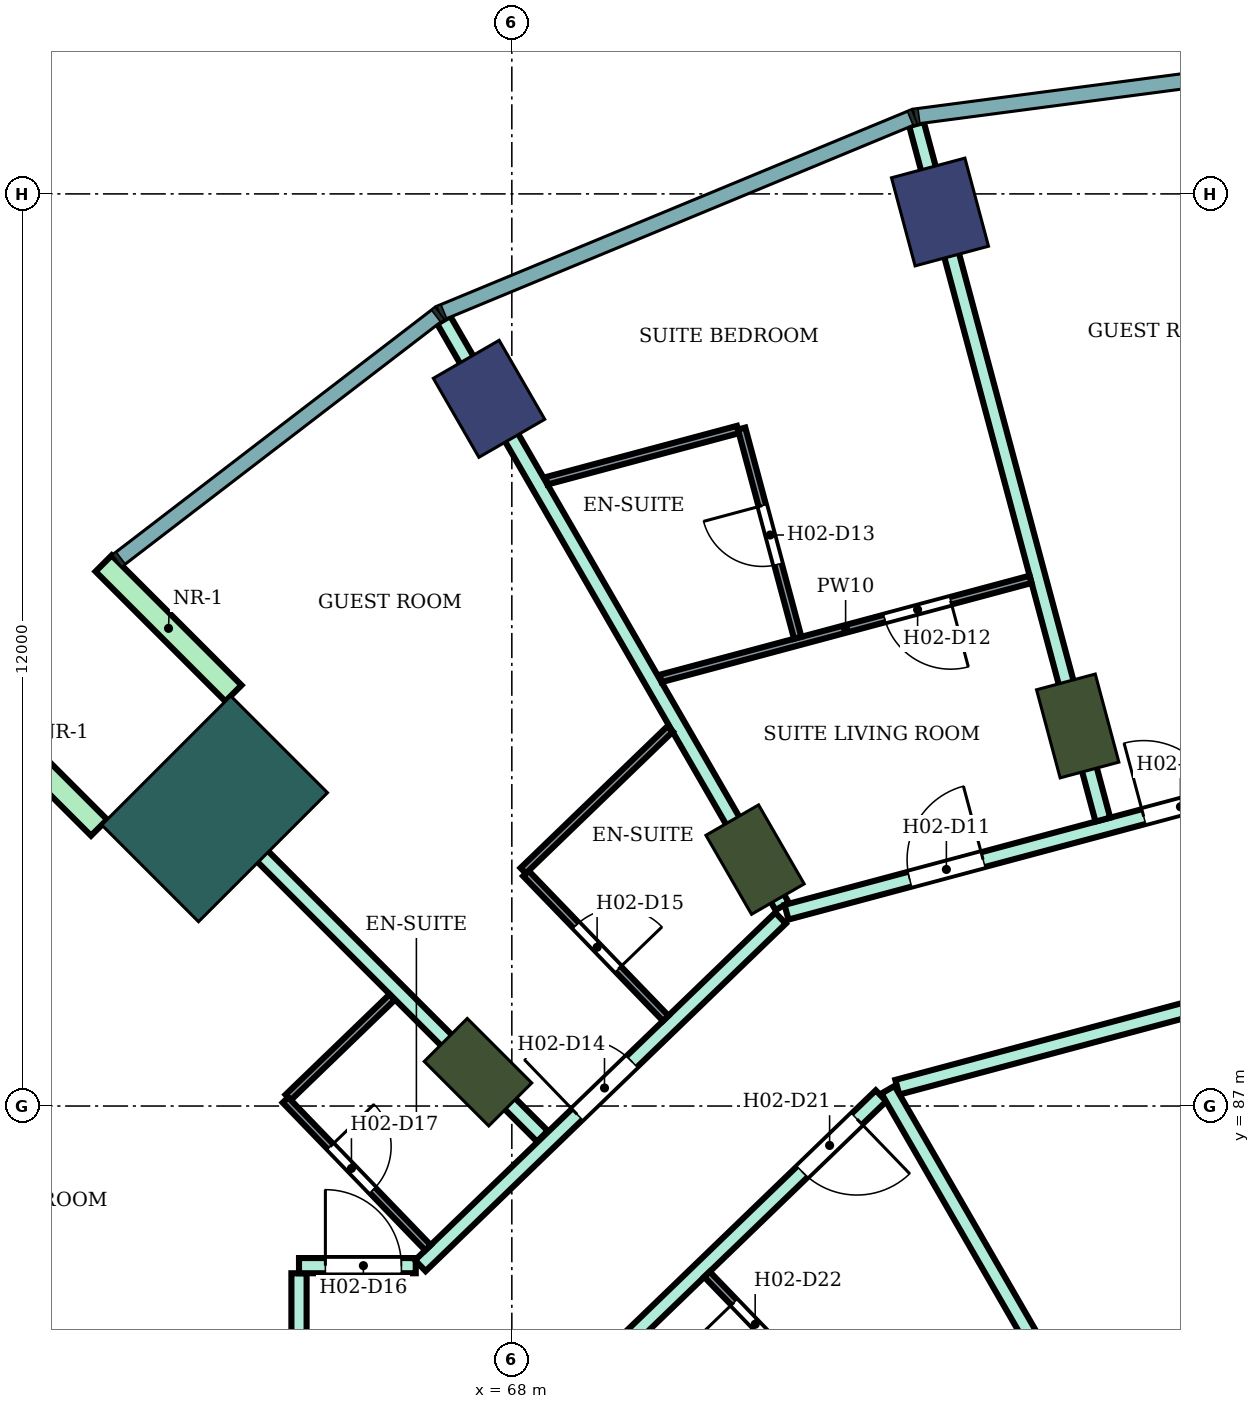
"""IFC4 building model, lengths in metres.
Left out: names, types, materials, properties, quantities, classifications, styles, units other than length and angle.
Written with IfcOpenShell. Run it as: python <this file> out.ifc"""

import sys

from ifc_helpers import new_model, si_unit, direction, frame, frame_2d, origin, origin_2d, place, context, subcontext, project, spatial, rectangle, extrude, element, fill, save


model = new_model("IFC4")
c1 = context("Model", 3, precision=1e-05, world=origin(), true_north=direction((0.0, 1.0)))
c2 = subcontext(c1, "Body", "Model", "MODEL_VIEW")
j1 = project(units=[si_unit("LENGTHUNIT", "METRE"), si_unit("PLANEANGLEUNIT", "RADIAN")], contexts=[c1])
p1 = place(None, origin())
s1 = spatial("IfcSite", under=j1, at=p1, CompositionType="ELEMENT")
p2 = place(p1, origin())
s2 = spatial("IfcBuilding", under=s1, at=p2, CompositionType="ELEMENT")
p3 = place(p2, frame((0.0, 0.0, 47.8)))
s3 = spatial("IfcBuildingStorey", under=s2, at=p3, CompositionType="ELEMENT", Elevation=47.8)
for number, where, z_axis, x_axis in (
    (1, (73.633, 98.762, 0.0), (0.0, 0.0, 1.0), (-0.259, 0.966, 0.0)),
    (2, (67.7, 96.304, 0.0), (0.0, 0.0, 1.0), (-0.5, 0.866, 0.0)),
):
    element("IfcColumn", number, at=place(p3, frame(where, z_axis=z_axis, x_axis=x_axis)), inside=s3, PredefinedType="COLUMN", context=c2, shape_type="SweptSolid", body=[
        extrude(rectangle(XDim=1.2, YDim=1.0, at=origin_2d()), origin(), (0.0, 0.0, 1.0), 3.8),
    ])
for number, where, z_axis, x_axis in (
    (3, (75.445, 92.0, 0.0), (0.0, 0.0, 1.0), (-0.259, 0.966, 0.0)),
    (4, (71.2, 90.242, 0.0), (0.0, 0.0, 1.0), (-0.5, 0.866, 0.0)),
    (5, (67.555, 87.445, 0.0), (0.0, 0.0, 1.0), (-0.707, 0.707, 0.0)),
):
    element("IfcColumn", number, at=place(p3, frame(where, z_axis=z_axis, x_axis=x_axis)), inside=s3, PredefinedType="COLUMN", context=c2, shape_type="SweptSolid", body=[
        extrude(rectangle(XDim=1.2, YDim=0.8, at=origin_2d()), origin(), (0.0, 0.0, 1.0), 3.8),
    ])
p4 = place(p3, frame((64.09, 90.91, 0.0), z_axis=(0.0, 0.0, 1.0), x_axis=(-0.707106781187, 0.707106781187, 0.0)))
e6 = element("IfcColumn", 6, at=p4, inside=s3, PredefinedType="COLUMN", context=c2, shape_type="SweptSolid", body=[
    extrude(rectangle(XDim=1.8, YDim=2.4, at=origin_2d()), origin(), (0.0, 0.0, 1.0), 3.8),
])
for number, where, z_axis, x_axis in (
    (7, (64.338, 92.43, 0.0), (0.0, 0.0, 1.0), (-0.707, 0.707, 0.0)),
    (8, (62.57, 90.662, 0.0), (0.0, 0.0, 1.0), (-0.707, 0.707, 0.0)),
):
    element("IfcWall", number, at=place(p3, frame(where, z_axis=z_axis, x_axis=x_axis)), inside=s3, PredefinedType="NOTDEFINED", context=c2, shape_type="SweptSolid", body=[
        extrude(rectangle(XDim=2.416, YDim=0.3, at=frame_2d((1.208, 0.0))), origin(), (0.0, 0.0, 1.0), 3.8),
    ])
p5 = place(p3, frame((63.599, 91.408, 0.0), z_axis=(0.0, 0.0, 1.0), x_axis=(0.706981017422, -0.707232522587, 0.0)))
e9 = element("IfcWall", 9, at=p5, inside=s3, PredefinedType="PARTITIONING", context=c2, shape_type="SweptSolid", body=[
    extrude(rectangle(XDim=6.795, YDim=0.2, at=frame_2d((3.397, 0.0))), origin(), (0.0, 0.0, 1.0), 3.35),
])
p6 = place(p3, frame((65.2, 83.401, 0.0), z_axis=(0.0, 0.0, 1.0), x_axis=(0.0, 1.0, 0.0)))
e10 = element("IfcWall", 10, at=p6, inside=s3, PredefinedType="PARTITIONING", context=c2, shape_type="SweptSolid", body=[
    extrude(rectangle(XDim=1.399, YDim=0.2, at=frame_2d((0.7, 0.0))), origin(), (0.0, 0.0, 1.0), 3.35),
])
p7 = place(p3, frame((65.2, 84.9, 0.0), z_axis=(0.0, 0.0, 1.0), x_axis=(1.0, 0.0, 0.0)))
e11 = element("IfcWall", 11, at=p7, inside=s3, PredefinedType="PARTITIONING", context=c2, shape_type="SweptSolid", body=[
    extrude(rectangle(XDim=1.536, YDim=0.2, at=frame_2d((0.768, 0.0))), origin(), (0.0, 0.0, 1.0), 3.35),
])
p8 = place(p7, frame((0.347, 0.0, 0.0)))
e12 = element("IfcOpeningElement", 12, at=p8, cuts=e11, PredefinedType="OPENING", context=c2, shape_type="SweptSolid", body=[
    extrude(rectangle(XDim=1.0, YDim=2.1, at=frame_2d((0.5, 1.05))), frame((0.0, 0.11, 0.0), z_axis=(0.0, -1.0, 0.0), x_axis=(1.0, 0.0, 0.0)), (0.0, 0.0, 1.0), 0.22),
])
p9 = place(p3, frame((66.796, 84.9, 0.0), z_axis=(0.0, 0.0, 1.0), x_axis=(0.719690131178, 0.694295409092, 0.0)))
e13 = element("IfcWall", 13, at=p9, inside=s3, PredefinedType="PARTITIONING", context=c2, shape_type="SweptSolid", body=[
    extrude(rectangle(XDim=6.585, YDim=0.2, at=frame_2d((3.293, 0.0))), origin(), (0.0, 0.0, 1.0), 3.35),
])
p10 = place(p9, frame((2.867, 0.0, 0.0)))
e14 = element("IfcOpeningElement", 14, at=p10, cuts=e13, PredefinedType="OPENING", context=c2, shape_type="SweptSolid", body=[
    extrude(rectangle(XDim=1.0, YDim=2.1, at=frame_2d((0.5, 1.05))), frame((0.0, 0.11, 0.0), z_axis=(0.0, -1.0, 0.0), x_axis=(1.0, 0.0, 0.0)), (0.0, 0.0, 1.0), 0.22),
])
p11 = place(p3, frame((67.103, 97.343, 0.0), z_axis=(0.0, 0.0, 1.0), x_axis=(0.499900389553, -0.866082906265, 0.0)))
e15 = element("IfcWall", 15, at=p11, inside=s3, PredefinedType="PARTITIONING", context=c2, shape_type="SweptSolid", body=[
    extrude(rectangle(XDim=8.908, YDim=0.2, at=frame_2d((4.454, 0.0))), origin(), (0.0, 0.0, 1.0), 3.35),
])
p12 = place(p3, frame((68.987, 83.4, 0.0), z_axis=(0.0, 0.0, 1.0), x_axis=(0.719591503389, 0.694397629784, 0.0)))
e16 = element("IfcWall", 16, at=p12, inside=s3, PredefinedType="PARTITIONING", context=c2, shape_type="SweptSolid", body=[
    extrude(rectangle(XDim=5.378, YDim=0.2, at=frame_2d((2.689, 0.0))), origin(), (0.0, 0.0, 1.0), 3.35),
])
p13 = place(p12, frame((3.938, 0.0, 0.0)))
e17 = element("IfcOpeningElement", 17, at=p13, cuts=e16, PredefinedType="OPENING", context=c2, shape_type="SweptSolid", body=[
    extrude(rectangle(XDim=1.0, YDim=2.1, at=frame_2d((0.5, 1.05))), frame((0.0, 0.11, 0.0), z_axis=(0.0, -1.0, 0.0), x_axis=(1.0, 0.0, 0.0)), (0.0, 0.0, 1.0), 0.22),
])
p14 = place(p3, frame((71.614, 89.55, 0.0), z_axis=(0.0, 0.0, 1.0), x_axis=(0.96597505802, 0.258635239832, 0.0)))
e18 = element("IfcWall", 18, at=p14, inside=s3, PredefinedType="PARTITIONING", context=c2, shape_type="SweptSolid", body=[
    extrude(rectangle(XDim=8.592, YDim=0.2, at=frame_2d((4.296, 0.0))), origin(), (0.0, 0.0, 1.0), 3.35),
])
p15 = place(p14, frame((4.865, 0.0, 0.0)))
e19 = element("IfcOpeningElement", 19, at=p15, cuts=e18, PredefinedType="OPENING", context=c2, shape_type="SweptSolid", body=[
    extrude(rectangle(XDim=1.0, YDim=2.1, at=frame_2d((0.5, 1.05))), frame((0.0, 0.11, 0.0), z_axis=(0.0, -1.0, 0.0), x_axis=(1.0, 0.0, 0.0)), (0.0, 0.0, 1.0), 0.22),
])
p16 = place(p14, frame((1.677, 0.0, 0.0)))
e20 = element("IfcOpeningElement", 20, at=p16, cuts=e18, PredefinedType="OPENING", context=c2, shape_type="SweptSolid", body=[
    extrude(rectangle(XDim=1.0, YDim=2.1, at=frame_2d((0.5, 1.05))), frame((0.0, 0.11, 0.0), z_axis=(0.0, -1.0, 0.0), x_axis=(1.0, 0.0, 0.0)), (0.0, 0.0, 1.0), 0.22),
])
p17 = place(p3, frame((73.071, 87.247, 0.0), z_axis=(0.0, 0.0, 1.0), x_axis=(0.965920206274, 0.258840018373, 0.0)))
e21 = element("IfcWall", 21, at=p17, inside=s3, PredefinedType="PARTITIONING", context=c2, shape_type="SweptSolid", body=[
    extrude(rectangle(XDim=7.123, YDim=0.2, at=frame_2d((3.562, 0.0))), origin(), (0.0, 0.0, 1.0), 3.35),
])
p18 = place(p3, frame((72.949, 87.215, 0.0), z_axis=(0.0, 0.0, 1.0), x_axis=(0.499890755261, -0.866088467077, 0.0)))
e22 = element("IfcWall", 22, at=p18, inside=s3, PredefinedType="PARTITIONING", context=c2, shape_type="SweptSolid", body=[
    extrude(rectangle(XDim=6.404, YDim=0.2, at=frame_2d((3.202, 0.0))), origin(), (0.0, 0.0, 1.0), 3.35),
])
p19 = place(p3, frame((73.323, 99.919, 0.0), z_axis=(0.0, 0.0, 1.0), x_axis=(0.258786746607, -0.965934480066, 0.0)))
e23 = element("IfcWall", 23, at=p19, inside=s3, PredefinedType="PARTITIONING", context=c2, shape_type="SweptSolid", body=[
    extrude(rectangle(XDim=9.475, YDim=0.2, at=frame_2d((4.737, 0.0))), origin(), (0.0, 0.0, 1.0), 3.35),
])
p20 = place(p3, frame((65.058, 87.114, 0.0), z_axis=(0.0, 0.0, 1.0), x_axis=(0.719715847356, 0.694268751324, 0.0)))
e24 = element("IfcWall", 24, at=p20, inside=s3, PredefinedType="PARTITIONING", context=c2, shape_type="SweptSolid", body=[
    extrude(rectangle(XDim=1.9, YDim=0.1, at=frame_2d((0.95, 0.0))), origin(), (0.0, 0.0, 1.0), 3.35),
])
p21 = place(p3, frame((65.022, 87.079, 0.0), z_axis=(0.0, 0.0, 1.0), x_axis=(0.694287838235, -0.719697434815, 0.0)))
e25 = element("IfcWall", 25, at=p21, inside=s3, PredefinedType="PARTITIONING", context=c2, shape_type="SweptSolid", body=[
    extrude(rectangle(XDim=2.7, YDim=0.1, at=frame_2d((1.35, 0.0))), origin(), (0.0, 0.0, 1.0), 3.35),
])
p22 = place(p21, frame((0.85, 0.0, 0.0)))
e26 = element("IfcOpeningElement", 26, at=p22, cuts=e25, PredefinedType="OPENING", context=c2, shape_type="SweptSolid", body=[
    extrude(rectangle(XDim=0.8, YDim=2.1, at=frame_2d((0.4, 1.05))), frame((0.0, 0.06, 0.0), z_axis=(0.0, -1.0, 0.0), x_axis=(1.0, 0.0, 0.0)), (0.0, 0.0, 1.0), 0.12),
])
p23 = place(p3, frame((68.185, 90.06, 0.0), z_axis=(0.0, 0.0, 1.0), x_axis=(0.69446127412, -0.719530081892, 0.0)))
e27 = element("IfcWall", 27, at=p23, inside=s3, PredefinedType="PARTITIONING", context=c2, shape_type="SweptSolid", body=[
    extrude(rectangle(XDim=2.649, YDim=0.1, at=frame_2d((1.324, 0.0))), origin(), (0.0, 0.0, 1.0), 3.35),
])
p24 = place(p23, frame((0.95, 0.0, 0.0)))
e28 = element("IfcOpeningElement", 28, at=p24, cuts=e27, PredefinedType="OPENING", context=c2, shape_type="SweptSolid", body=[
    extrude(rectangle(XDim=0.8, YDim=2.1, at=frame_2d((0.4, 1.05))), frame((0.0, 0.06, 0.0), z_axis=(0.0, -1.0, 0.0), x_axis=(1.0, 0.0, 0.0)), (0.0, 0.0, 1.0), 0.12),
])
p25 = place(p3, frame((68.15, 90.096, 0.0), z_axis=(0.0, 0.0, 1.0), x_axis=(0.719623741095, 0.69436422089, 0.0)))
e29 = element("IfcWall", 29, at=p25, inside=s3, PredefinedType="PARTITIONING", context=c2, shape_type="SweptSolid", body=[
    extrude(rectangle(XDim=2.687, YDim=0.1, at=frame_2d((1.344, 0.0))), origin(), (0.0, 0.0, 1.0), 3.35),
])
p26 = place(p3, frame((68.457, 95.225, 0.0), z_axis=(0.0, 0.0, 1.0), x_axis=(0.965887416682, 0.258962349183, 0.0)))
e30 = element("IfcWall", 30, at=p26, inside=s3, PredefinedType="PARTITIONING", context=c2, shape_type="SweptSolid", body=[
    extrude(rectangle(XDim=2.607, YDim=0.1, at=frame_2d((1.303, 0.0))), origin(), (0.0, 0.0, 1.0), 3.35),
])
p27 = place(p3, frame((69.958, 92.625, 0.0), z_axis=(0.0, 0.0, 1.0), x_axis=(0.96595043048, 0.258727203548, 0.0)))
e31 = element("IfcWall", 31, at=p27, inside=s3, PredefinedType="PARTITIONING", context=c2, shape_type="SweptSolid", body=[
    extrude(rectangle(XDim=5.038, YDim=0.1, at=frame_2d((2.519, 0.0))), origin(), (0.0, 0.0, 1.0), 3.35),
])
p28 = place(p27, frame((3.049, 0.0, 0.0)))
e32 = element("IfcOpeningElement", 32, at=p28, cuts=e31, PredefinedType="OPENING", context=c2, shape_type="SweptSolid", body=[
    extrude(rectangle(XDim=0.9, YDim=2.1, at=frame_2d((0.45, 1.05))), frame((0.0, 0.06, 0.0), z_axis=(0.0, -1.0, 0.0), x_axis=(1.0, 0.0, 0.0)), (0.0, 0.0, 1.0), 0.12),
])
p29 = place(p3, frame((70.567, 84.786, 0.0), z_axis=(0.0, 0.0, 1.0), x_axis=(0.694447472534, -0.719543402368, 0.0)))
e33 = element("IfcWall", 33, at=p29, inside=s3, PredefinedType="PARTITIONING", context=c2, shape_type="SweptSolid", body=[
    extrude(rectangle(XDim=1.926, YDim=0.1, at=frame_2d((0.963, 0.0))), origin(), (0.0, 0.0, 1.0), 3.35),
])
p30 = place(p29, frame((0.513, 0.0, 0.0)))
e34 = element("IfcOpeningElement", 34, at=p30, cuts=e33, PredefinedType="OPENING", context=c2, shape_type="SweptSolid", body=[
    extrude(rectangle(XDim=0.8, YDim=2.1, at=frame_2d((0.4, 1.05))), frame((0.0, 0.06, 0.0), z_axis=(0.0, -1.0, 0.0), x_axis=(1.0, 0.0, 0.0)), (0.0, 0.0, 1.0), 0.12),
])
p31 = place(p3, frame((71.023, 95.913, 0.0), z_axis=(0.0, 0.0, 1.0), x_axis=(0.258968734817, -0.965885704619, 0.0)))
e35 = element("IfcWall", 35, at=p31, inside=s3, PredefinedType="PARTITIONING", context=c2, shape_type="SweptSolid", body=[
    extrude(rectangle(XDim=2.85, YDim=0.1, at=frame_2d((1.425, 0.0))), origin(), (0.0, 0.0, 1.0), 3.35),
])
p32 = place(p31, frame((1.05, 0.0, 0.0)))
e36 = element("IfcOpeningElement", 36, at=p32, cuts=e35, PredefinedType="OPENING", context=c2, shape_type="SweptSolid", body=[
    extrude(rectangle(XDim=0.8, YDim=2.1, at=frame_2d((0.4, 1.05))), frame((0.0, 0.06, 0.0), z_axis=(0.0, -1.0, 0.0), x_axis=(1.0, 0.0, 0.0)), (0.0, 0.0, 1.0), 0.12),
])
p33 = place(p15, origin())
e37 = element("IfcDoor", 37, at=p33, inside=s3, OperationType="SINGLE_SWING_LEFT", PredefinedType="DOOR", context=c2, shape_type="SweptSolid", body=[
    extrude(rectangle(XDim=1.0, YDim=2.1, at=frame_2d((0.5, 1.05))), frame((0.0, 0.025, 0.0), z_axis=(0.0, -1.0, 0.0), x_axis=(1.0, 0.0, 0.0)), (0.0, 0.0, 1.0), 0.05),
])
fill(e19, e37)
p34 = place(p16, origin())
e38 = element("IfcDoor", 38, at=p34, inside=s3, OperationType="SINGLE_SWING_RIGHT", PredefinedType="DOOR", context=c2, shape_type="SweptSolid", body=[
    extrude(rectangle(XDim=1.0, YDim=2.1, at=frame_2d((0.5, 1.05))), frame((0.0, 0.025, 0.0), z_axis=(0.0, -1.0, 0.0), x_axis=(1.0, 0.0, 0.0)), (0.0, 0.0, 1.0), 0.05),
])
fill(e20, e38)
p35 = place(p28, frame((0.9, 0.0, 0.0), z_axis=(0.0, 0.0, 1.0), x_axis=(-1.0, 0.0, 0.0)))
e39 = element("IfcDoor", 39, at=p35, inside=s3, OperationType="SINGLE_SWING_LEFT", PredefinedType="DOOR", context=c2, shape_type="SweptSolid", body=[
    extrude(rectangle(XDim=0.9, YDim=2.1, at=frame_2d((0.45, 1.05))), frame((0.0, 0.025, 0.0), z_axis=(0.0, -1.0, 0.0), x_axis=(1.0, 0.0, 0.0)), (0.0, 0.0, 1.0), 0.05),
])
fill(e32, e39)
p36 = place(p32, frame((0.8, 0.0, 0.0), z_axis=(0.0, 0.0, 1.0), x_axis=(-1.0, 0.0, 0.0)))
e40 = element("IfcDoor", 40, at=p36, inside=s3, OperationType="SINGLE_SWING_RIGHT", PredefinedType="DOOR", context=c2, shape_type="SweptSolid", body=[
    extrude(rectangle(XDim=0.8, YDim=2.1, at=frame_2d((0.4, 1.05))), frame((0.0, 0.025, 0.0), z_axis=(0.0, -1.0, 0.0), x_axis=(1.0, 0.0, 0.0)), (0.0, 0.0, 1.0), 0.05),
])
fill(e36, e40)
p37 = place(p10, origin())
e41 = element("IfcDoor", 41, at=p37, inside=s3, OperationType="SINGLE_SWING_LEFT", PredefinedType="DOOR", context=c2, shape_type="SweptSolid", body=[
    extrude(rectangle(XDim=1.0, YDim=2.1, at=frame_2d((0.5, 1.05))), frame((0.0, 0.025, 0.0), z_axis=(0.0, -1.0, 0.0), x_axis=(1.0, 0.0, 0.0)), (0.0, 0.0, 1.0), 0.05),
])
fill(e14, e41)
p38 = place(p24, origin())
e42 = element("IfcDoor", 42, at=p38, inside=s3, OperationType="SINGLE_SWING_RIGHT", PredefinedType="DOOR", context=c2, shape_type="SweptSolid", body=[
    extrude(rectangle(XDim=0.8, YDim=2.1, at=frame_2d((0.4, 1.05))), frame((0.0, 0.025, 0.0), z_axis=(0.0, -1.0, 0.0), x_axis=(1.0, 0.0, 0.0)), (0.0, 0.0, 1.0), 0.05),
])
fill(e28, e42)
p39 = place(p8, origin())
e43 = element("IfcDoor", 43, at=p39, inside=s3, OperationType="SINGLE_SWING_LEFT", PredefinedType="DOOR", context=c2, shape_type="SweptSolid", body=[
    extrude(rectangle(XDim=1.0, YDim=2.1, at=frame_2d((0.5, 1.05))), frame((0.0, 0.025, 0.0), z_axis=(0.0, -1.0, 0.0), x_axis=(1.0, 0.0, 0.0)), (0.0, 0.0, 1.0), 0.05),
])
fill(e12, e43)
p40 = place(p22, origin())
e44 = element("IfcDoor", 44, at=p40, inside=s3, OperationType="SINGLE_SWING_LEFT", PredefinedType="DOOR", context=c2, shape_type="SweptSolid", body=[
    extrude(rectangle(XDim=0.8, YDim=2.1, at=frame_2d((0.4, 1.05))), frame((0.0, 0.025, 0.0), z_axis=(0.0, -1.0, 0.0), x_axis=(1.0, 0.0, 0.0)), (0.0, 0.0, 1.0), 0.05),
])
fill(e26, e44)
p41 = place(p13, frame((1.0, 0.0, 0.0), z_axis=(0.0, 0.0, 1.0), x_axis=(-1.0, 0.0, 0.0)))
e45 = element("IfcDoor", 45, at=p41, inside=s3, OperationType="SINGLE_SWING_LEFT", PredefinedType="DOOR", context=c2, shape_type="SweptSolid", body=[
    extrude(rectangle(XDim=1.0, YDim=2.1, at=frame_2d((0.5, 1.05))), frame((0.0, 0.025, 0.0), z_axis=(0.0, -1.0, 0.0), x_axis=(1.0, 0.0, 0.0)), (0.0, 0.0, 1.0), 0.05),
])
fill(e17, e45)
p42 = place(p30, frame((0.8, 0.0, 0.0), z_axis=(0.0, 0.0, 1.0), x_axis=(-1.0, 0.0, 0.0)))
e46 = element("IfcDoor", 46, at=p42, inside=s3, OperationType="SINGLE_SWING_RIGHT", PredefinedType="DOOR", context=c2, shape_type="SweptSolid", body=[
    extrude(rectangle(XDim=0.8, YDim=2.1, at=frame_2d((0.4, 1.05))), frame((0.0, 0.025, 0.0), z_axis=(0.0, -1.0, 0.0), x_axis=(1.0, 0.0, 0.0)), (0.0, 0.0, 1.0), 0.05),
])
fill(e34, e46)
save(model, sys.argv[1])
